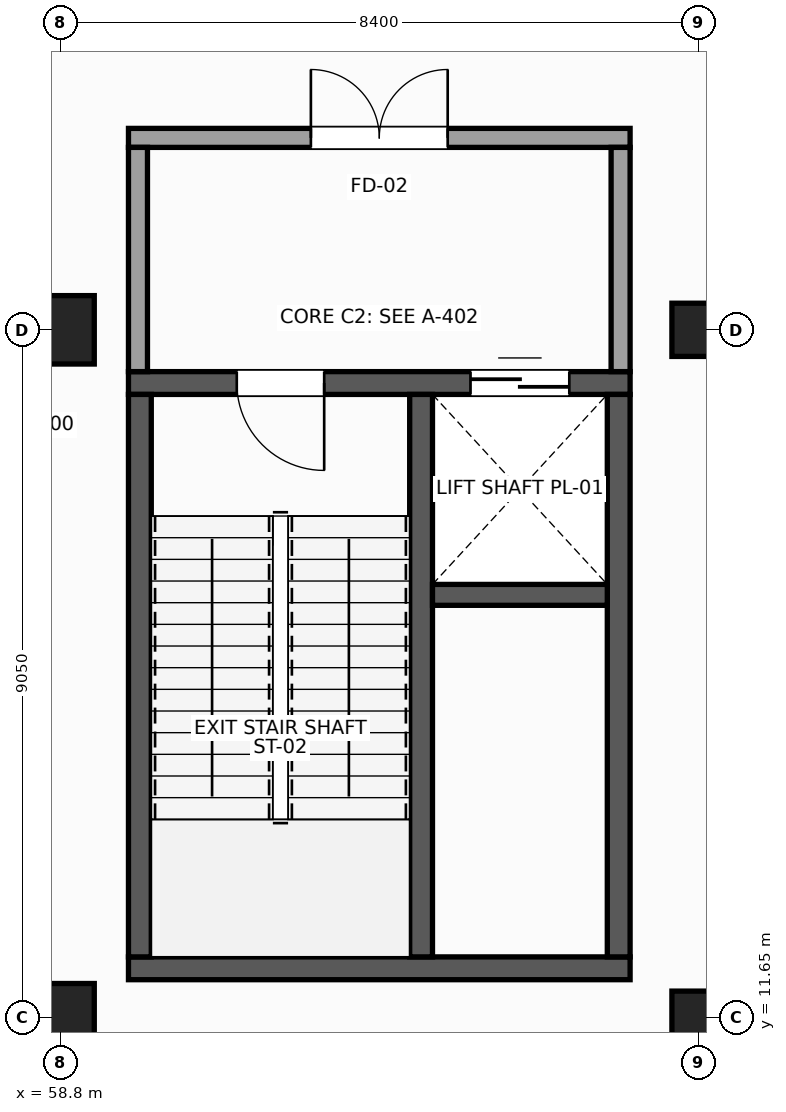
"""IFC4 building model, lengths in metres.
Left out: names, types, materials, properties, quantities, classifications, styles, units other than length and angle.
Written with IfcOpenShell. Run it as: python <this file> out.ifc"""

import sys

from ifc_helpers import new_model, si_unit, direction, frame, frame_2d, origin, origin_2d, place, context, subcontext, project, spatial, rectangle, extrude, element, fill, save


model = new_model("IFC4")
c1 = context("Model", 3, precision=1e-05, world=origin(), true_north=direction((0.0, 1.0)))
c2 = subcontext(c1, "Body", "Model", "MODEL_VIEW")
j1 = project(units=[si_unit("LENGTHUNIT", "METRE"), si_unit("PLANEANGLEUNIT", "RADIAN")], contexts=[c1])
p1 = place(None, origin())
s1 = spatial("IfcSite", under=j1, at=p1, CompositionType="ELEMENT")
p2 = place(p1, origin())
s2 = spatial("IfcBuilding", under=s1, at=p2, CompositionType="ELEMENT")
p3 = place(p2, frame((0.0, 0.0, 5.4)))
s3 = spatial("IfcBuildingStorey", under=s2, at=p3, CompositionType="ELEMENT", Elevation=5.4)
for number, where, z_axis, x_axis in (
    (1, (58.8, 11.65, 0.0), (0.0, 0.0, 1.0), (1.0, 0.0, 0.0)),
    (2, (58.8, 20.7, 0.0), (0.0, 0.0, 1.0), (1.0, 0.0, 0.0)),
):
    element("IfcColumn", number, at=place(p3, frame(where, z_axis=z_axis, x_axis=x_axis)), inside=s3, PredefinedType="COLUMN", context=c2, shape_type="SweptSolid", body=[
        extrude(rectangle(XDim=0.9, YDim=0.9, at=origin_2d()), origin(), (0.0, 0.0, 1.0), 5.4),
    ])
for number, where, z_axis, x_axis in (
    (3, (67.2, 11.65, 0.0), (0.0, 0.0, 1.0), (1.0, 0.0, 0.0)),
    (4, (67.2, 20.7, 0.0), (0.0, 0.0, 1.0), (1.0, 0.0, 0.0)),
):
    element("IfcColumn", number, at=place(p3, frame(where, z_axis=z_axis, x_axis=x_axis)), inside=s3, PredefinedType="COLUMN", context=c2, shape_type="SweptSolid", body=[
        extrude(rectangle(XDim=0.7, YDim=0.7, at=origin_2d()), origin(), (0.0, 0.0, 1.0), 5.4),
    ])
p4 = place(p3, frame((59.7, 12.3, 0.0), z_axis=(0.0, 0.0, 1.0), x_axis=(1.0, 0.0, 0.0)))
e5 = element("IfcWall", 5, at=p4, inside=s3, PredefinedType="SHEAR", context=c2, shape_type="SweptSolid", body=[
    extrude(rectangle(XDim=6.6, YDim=0.3, at=frame_2d((3.3, 0.0))), origin(), (0.0, 0.0, 1.0), 5.1),
])
p5 = place(p3, frame((59.7, 20.0, 0.0), z_axis=(0.0, 0.0, 1.0), x_axis=(1.0, 0.0, 0.0)))
e6 = element("IfcWall", 6, at=p5, inside=s3, PredefinedType="SHEAR", context=c2, shape_type="SweptSolid", body=[
    extrude(rectangle(XDim=6.6, YDim=0.3, at=frame_2d((3.3, 0.0))), origin(), (0.0, 0.0, 1.0), 5.1),
])
p6 = place(p5, frame((1.425, 0.0, 0.0)))
e7 = element("IfcOpeningElement", 7, at=p6, cuts=e6, PredefinedType="OPENING", context=c2, shape_type="SweptSolid", body=[
    extrude(rectangle(XDim=1.15, YDim=2.2, at=frame_2d((0.575, 1.1))), frame((0.0, 0.16, 0.0), z_axis=(0.0, -1.0, 0.0), x_axis=(1.0, 0.0, 0.0)), (0.0, 0.0, 1.0), 0.32),
])
p7 = place(p5, frame((4.5, 0.0, 0.0)))
e8 = element("IfcOpeningElement", 8, at=p7, cuts=e6, PredefinedType="OPENING", context=c2, shape_type="SweptSolid", body=[
    extrude(rectangle(XDim=1.3, YDim=2.2, at=frame_2d((0.65, 1.1))), frame((0.0, 0.16, 0.0), z_axis=(0.0, -1.0, 0.0), x_axis=(1.0, 0.0, 0.0)), (0.0, 0.0, 1.0), 0.32),
])
for number, where, z_axis, x_axis in (
    (9, (59.85, 12.45, 0.0), (0.0, 0.0, 1.0), (0.0, 1.0, 0.0)),
    (10, (66.15, 12.45, 0.0), (0.0, 0.0, 1.0), (0.0, 1.0, 0.0)),
    (11, (63.55, 12.45, 0.0), (0.0, 0.0, 1.0), (0.0, 1.0, 0.0)),
):
    element("IfcWall", number, at=place(p3, frame(where, z_axis=z_axis, x_axis=x_axis)), inside=s3, PredefinedType="SHEAR", context=c2, shape_type="SweptSolid", body=[
        extrude(rectangle(XDim=7.4, YDim=0.3, at=frame_2d((3.7, 0.0))), origin(), (0.0, 0.0, 1.0), 5.1),
    ])
p8 = place(p3, frame((63.7, 17.213, 0.0), z_axis=(0.0, 0.0, 1.0), x_axis=(1.0, 0.0, 0.0)))
e12 = element("IfcWall", 12, at=p8, inside=s3, PredefinedType="SHEAR", context=c2, shape_type="SweptSolid", body=[
    extrude(rectangle(XDim=2.3, YDim=0.275, at=frame_2d((1.15, 0.0))), origin(), (0.0, 0.0, 1.0), 5.1),
])
p9 = place(p3, frame((59.7, 23.225, 0.0), z_axis=(0.0, 0.0, 1.0), x_axis=(1.0, 0.0, 0.0)))
e13 = element("IfcWall", 13, at=p9, inside=s3, PredefinedType="PARTITIONING", context=c2, shape_type="SweptSolid", body=[
    extrude(rectangle(XDim=6.6, YDim=0.25, at=frame_2d((3.3, 0.0))), origin(), (0.0, 0.0, 1.0), 5.1),
])
p10 = place(p9, frame((2.4, 0.0, 0.0)))
e14 = element("IfcOpeningElement", 14, at=p10, cuts=e13, PredefinedType="OPENING", context=c2, shape_type="SweptSolid", body=[
    extrude(rectangle(XDim=1.8, YDim=2.25, at=frame_2d((0.9, 1.125))), frame((0.0, 0.135, 0.0), z_axis=(0.0, -1.0, 0.0), x_axis=(1.0, 0.0, 0.0)), (0.0, 0.0, 1.0), 0.27),
])
for number, where, z_axis, x_axis in (
    (15, (59.825, 20.15, 0.0), (0.0, 0.0, 1.0), (0.0, 1.0, 0.0)),
    (16, (66.175, 20.15, 0.0), (0.0, 0.0, 1.0), (0.0, 1.0, 0.0)),
):
    element("IfcWall", number, at=place(p3, frame(where, z_axis=z_axis, x_axis=x_axis)), inside=s3, PredefinedType="PARTITIONING", context=c2, shape_type="SweptSolid", body=[
        extrude(rectangle(XDim=2.95, YDim=0.25, at=frame_2d((1.475, 0.0))), origin(), (0.0, 0.0, 1.0), 4.33),
    ])
p11 = place(p6, frame((1.15, 0.0, 0.0), z_axis=(0.0, 0.0, 1.0), x_axis=(-1.0, 0.0, 0.0)))
e17 = element("IfcDoor", 17, at=p11, inside=s3, OperationType="SINGLE_SWING_LEFT", PredefinedType="DOOR", context=c2, shape_type="SweptSolid", body=[
    extrude(rectangle(XDim=1.15, YDim=2.2, at=frame_2d((0.575, 1.1))), frame((0.0, 0.025, 0.0), z_axis=(0.0, -1.0, 0.0), x_axis=(1.0, 0.0, 0.0)), (0.0, 0.0, 1.0), 0.05),
])
fill(e7, e17)
p12 = place(p7, origin())
e18 = element("IfcDoor", 18, at=p12, inside=s3, OperationType="DOUBLE_DOOR_SLIDING", PredefinedType="DOOR", context=c2, shape_type="SweptSolid", body=[
    extrude(rectangle(XDim=1.3, YDim=2.2, at=frame_2d((0.65, 1.1))), frame((0.0, 0.025, 0.0), z_axis=(0.0, -1.0, 0.0), x_axis=(1.0, 0.0, 0.0)), (0.0, 0.0, 1.0), 0.05),
])
fill(e8, e18)
p13 = place(p10, origin())
e19 = element("IfcDoor", 19, at=p13, inside=s3, OperationType="DOUBLE_DOOR_SINGLE_SWING", PredefinedType="DOOR", context=c2, shape_type="SweptSolid", body=[
    extrude(rectangle(XDim=1.8, YDim=2.25, at=frame_2d((0.9, 1.125))), frame((0.0, 0.025, 0.0), z_axis=(0.0, -1.0, 0.0), x_axis=(1.0, 0.0, 0.0)), (0.0, 0.0, 1.0), 0.05),
])
fill(e14, e19)
save(model, sys.argv[1])
